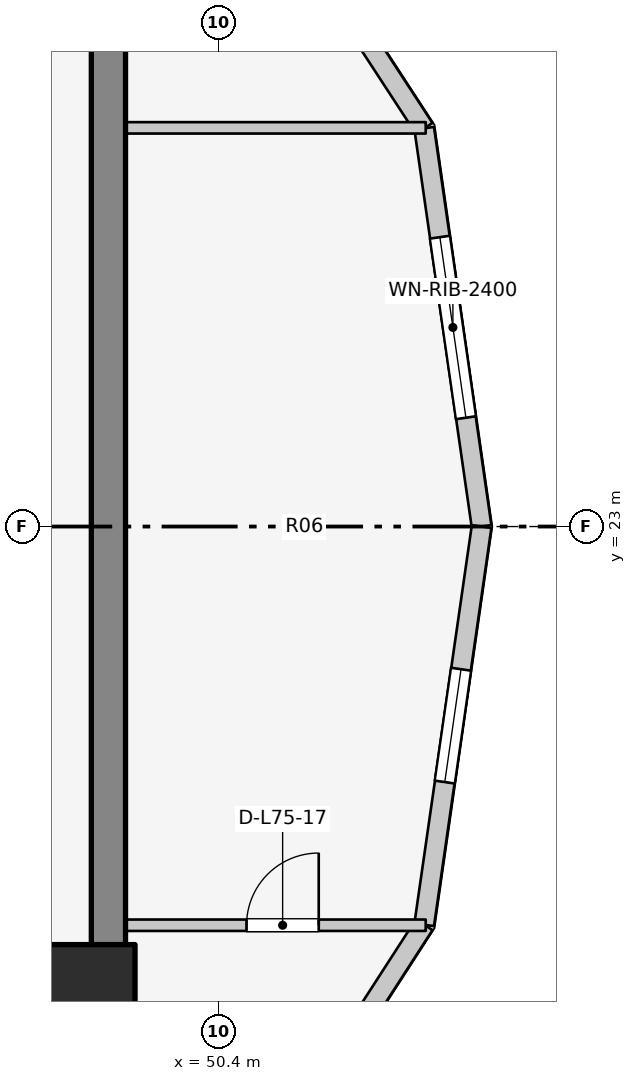
"""IFC4 building model, lengths in metres.
Left out: names, types, materials, properties, quantities, classifications, styles, units other than length and angle.
Written with IfcOpenShell. Run it as: python <this file> out.ifc"""

import sys

from ifc_helpers import new_model, si_unit, direction, frame, frame_2d, origin, origin_2d, place, context, subcontext, project, spatial, rectangle, extrude, element, fill, save


model = new_model("IFC4")
c1 = context("Model", 3, precision=1e-05, world=origin(), true_north=direction((0.0, 1.0)))
c2 = subcontext(c1, "Body", "Model", "MODEL_VIEW")
j1 = project(units=[si_unit("LENGTHUNIT", "METRE"), si_unit("PLANEANGLEUNIT", "RADIAN")], contexts=[c1])
p1 = place(None, origin())
s1 = spatial("IfcSite", under=j1, at=p1, CompositionType="ELEMENT")
p2 = place(p1, origin())
s2 = spatial("IfcBuilding", under=s1, at=p2, CompositionType="ELEMENT")
p3 = place(p2, frame((0.0, 0.0, 246.0)))
s3 = spatial("IfcBuildingStorey", under=s2, at=p3, CompositionType="ELEMENT", Elevation=246.0)
p4 = place(p3, frame((48.95, 17.05, 0.0), z_axis=(0.0, 0.0, 1.0), x_axis=(0.0, 1.0, 0.0)))
e1 = element("IfcWall", 1, at=p4, inside=s3, PredefinedType="SHEAR", context=c2, shape_type="SweptSolid", body=[
    extrude(rectangle(XDim=12.8, YDim=0.45, at=frame_2d((6.4, 0.0))), origin(), (0.0, 0.0, 1.0), 3.6),
])
p5 = place(p3, frame((48.7, 16.9, 0.0), z_axis=(0.0, 0.0, 1.0), x_axis=(1.0, 0.0, 0.0)))
e2 = element("IfcColumn", 2, at=p5, inside=s3, PredefinedType="COLUMN", context=c2, shape_type="SweptSolid", body=[
    extrude(rectangle(XDim=1.2, YDim=1.2, at=origin_2d()), origin(), (0.0, 0.0, 1.0), 3.6),
])
p6 = place(p3, frame((53.86, 23.0, 0.0), z_axis=(0.0, 0.0, 1.0), x_axis=(-0.142712754019, 0.989764148593, 0.0)))
e3 = element("IfcWall", 3, at=p6, inside=s3, PredefinedType="STANDARD", context=c2, shape_type="SweptSolid", body=[
    extrude(rectangle(XDim=5.293, YDim=0.26, at=frame_2d((2.646, 0.0))), origin(), (0.0, 0.0, 1.0), 3.29),
])
p7 = place(p6, frame((1.447, 0.0, 0.75)))
e4 = element("IfcOpeningElement", 4, at=p7, cuts=e3, PredefinedType="OPENING", context=c2, shape_type="SweptSolid", body=[
    extrude(rectangle(XDim=2.4, YDim=1.7, at=frame_2d((1.2, 0.85))), frame((0.0, 0.14, 0.0), z_axis=(0.0, -1.0, 0.0), x_axis=(1.0, 0.0, 0.0)), (0.0, 0.0, 1.0), 0.28),
])
p8 = place(p3, frame((53.105, 28.239, 0.0), z_axis=(0.0, 0.0, 1.0), x_axis=(-0.546606419826, 0.837389647539, 0.0)))
e5 = element("IfcWall", 5, at=p8, inside=s3, PredefinedType="STANDARD", context=c2, shape_type="SweptSolid", body=[
    extrude(rectangle(XDim=4.288, YDim=0.26, at=frame_2d((2.144, 0.0))), origin(), (0.0, 0.0, 1.0), 3.29),
])
p9 = place(p8, frame((1.394, 0.0, 0.75)))
e6 = element("IfcOpeningElement", 6, at=p9, cuts=e5, PredefinedType="OPENING", context=c2, shape_type="SweptSolid", body=[
    extrude(rectangle(XDim=1.5, YDim=1.6, at=frame_2d((0.75, 0.8))), frame((0.0, 0.14, 0.0), z_axis=(0.0, -1.0, 0.0), x_axis=(1.0, 0.0, 0.0)), (0.0, 0.0, 1.0), 0.28),
])
p10 = place(p3, frame((50.761, 14.133, 0.0), z_axis=(0.0, 0.0, 1.0), x_axis=(0.542641766008, 0.839964233634, 0.0)))
e7 = element("IfcWall", 7, at=p10, inside=s3, PredefinedType="STANDARD", context=c2, shape_type="SweptSolid", body=[
    extrude(rectangle(XDim=4.319, YDim=0.26, at=frame_2d((2.16, 0.0))), origin(), (0.0, 0.0, 1.0), 3.29),
])
p11 = place(p10, frame((1.41, 0.0, 0.75)))
e8 = element("IfcOpeningElement", 8, at=p11, cuts=e7, PredefinedType="OPENING", context=c2, shape_type="SweptSolid", body=[
    extrude(rectangle(XDim=1.5, YDim=1.6, at=frame_2d((0.75, 0.8))), frame((0.0, 0.14, 0.0), z_axis=(0.0, -1.0, 0.0), x_axis=(1.0, 0.0, 0.0)), (0.0, 0.0, 1.0), 0.28),
])
p12 = place(p3, frame((53.105, 17.761, 0.0), z_axis=(0.0, 0.0, 1.0), x_axis=(0.142712754019, 0.989764148593, 0.0)))
e9 = element("IfcWall", 9, at=p12, inside=s3, PredefinedType="STANDARD", context=c2, shape_type="SweptSolid", body=[
    extrude(rectangle(XDim=5.293, YDim=0.26, at=frame_2d((2.646, 0.0))), origin(), (0.0, 0.0, 1.0), 3.29),
])
p13 = place(p12, frame((1.896, 0.0, 0.75)))
e10 = element("IfcOpeningElement", 10, at=p13, cuts=e9, PredefinedType="OPENING", context=c2, shape_type="SweptSolid", body=[
    extrude(rectangle(XDim=1.5, YDim=1.6, at=frame_2d((0.75, 0.8))), frame((0.0, 0.14, 0.0), z_axis=(0.0, -1.0, 0.0), x_axis=(1.0, 0.0, 0.0)), (0.0, 0.0, 1.0), 0.28),
])
p14 = place(p3, frame((48.95, 17.755, 0.0), z_axis=(0.0, 0.0, 1.0), x_axis=(1.0, 0.0, 0.0)))
e11 = element("IfcWall", 11, at=p14, inside=s3, PredefinedType="PARTITIONING", context=c2, shape_type="SweptSolid", body=[
    extrude(rectangle(XDim=4.175, YDim=0.15, at=frame_2d((2.087, 0.0))), origin(), (0.0, 0.0, 1.0), 3.295),
])
p15 = place(p14, frame((1.817, 0.0, 0.0)))
e12 = element("IfcOpeningElement", 12, at=p15, cuts=e11, PredefinedType="OPENING", context=c2, shape_type="SweptSolid", body=[
    extrude(rectangle(XDim=0.95, YDim=2.1, at=frame_2d((0.475, 1.05))), frame((0.0, 0.085, 0.0), z_axis=(0.0, -1.0, 0.0), x_axis=(1.0, 0.0, 0.0)), (0.0, 0.0, 1.0), 0.17),
])
p16 = place(p3, frame((48.95, 28.245, 0.0), z_axis=(0.0, 0.0, 1.0), x_axis=(1.0, 0.0, 0.0)))
e13 = element("IfcWall", 13, at=p16, inside=s3, PredefinedType="PARTITIONING", context=c2, shape_type="SweptSolid", body=[
    extrude(rectangle(XDim=4.175, YDim=0.15, at=frame_2d((2.087, 0.0))), origin(), (0.0, 0.0, 1.0), 3.295),
])
p17 = place(p7, origin())
e14 = element("IfcWindow", 14, at=p17, inside=s3, PartitioningType="SINGLE_PANEL", PredefinedType="WINDOW", context=c2, shape_type="SweptSolid", body=[
    extrude(rectangle(XDim=2.4, YDim=1.7, at=frame_2d((1.2, 0.85))), frame((0.0, 0.03, 0.0), z_axis=(0.0, -1.0, 0.0), x_axis=(1.0, 0.0, 0.0)), (0.0, 0.0, 1.0), 0.06),
])
fill(e4, e14)
p18 = place(p13, origin())
e15 = element("IfcWindow", 15, at=p18, inside=s3, PartitioningType="SINGLE_PANEL", PredefinedType="WINDOW", context=c2, shape_type="SweptSolid", body=[
    extrude(rectangle(XDim=1.5, YDim=1.6, at=frame_2d((0.75, 0.8))), frame((0.0, 0.03, 0.0), z_axis=(0.0, -1.0, 0.0), x_axis=(1.0, 0.0, 0.0)), (0.0, 0.0, 1.0), 0.06),
])
fill(e10, e15)
p19 = place(p15, origin())
e16 = element("IfcDoor", 16, at=p19, inside=s3, OperationType="SINGLE_SWING_RIGHT", PredefinedType="DOOR", context=c2, shape_type="SweptSolid", body=[
    extrude(rectangle(XDim=0.95, YDim=2.1, at=frame_2d((0.475, 1.05))), frame((0.0, 0.025, 0.0), z_axis=(0.0, -1.0, 0.0), x_axis=(1.0, 0.0, 0.0)), (0.0, 0.0, 1.0), 0.05),
])
fill(e12, e16)
save(model, sys.argv[1])
